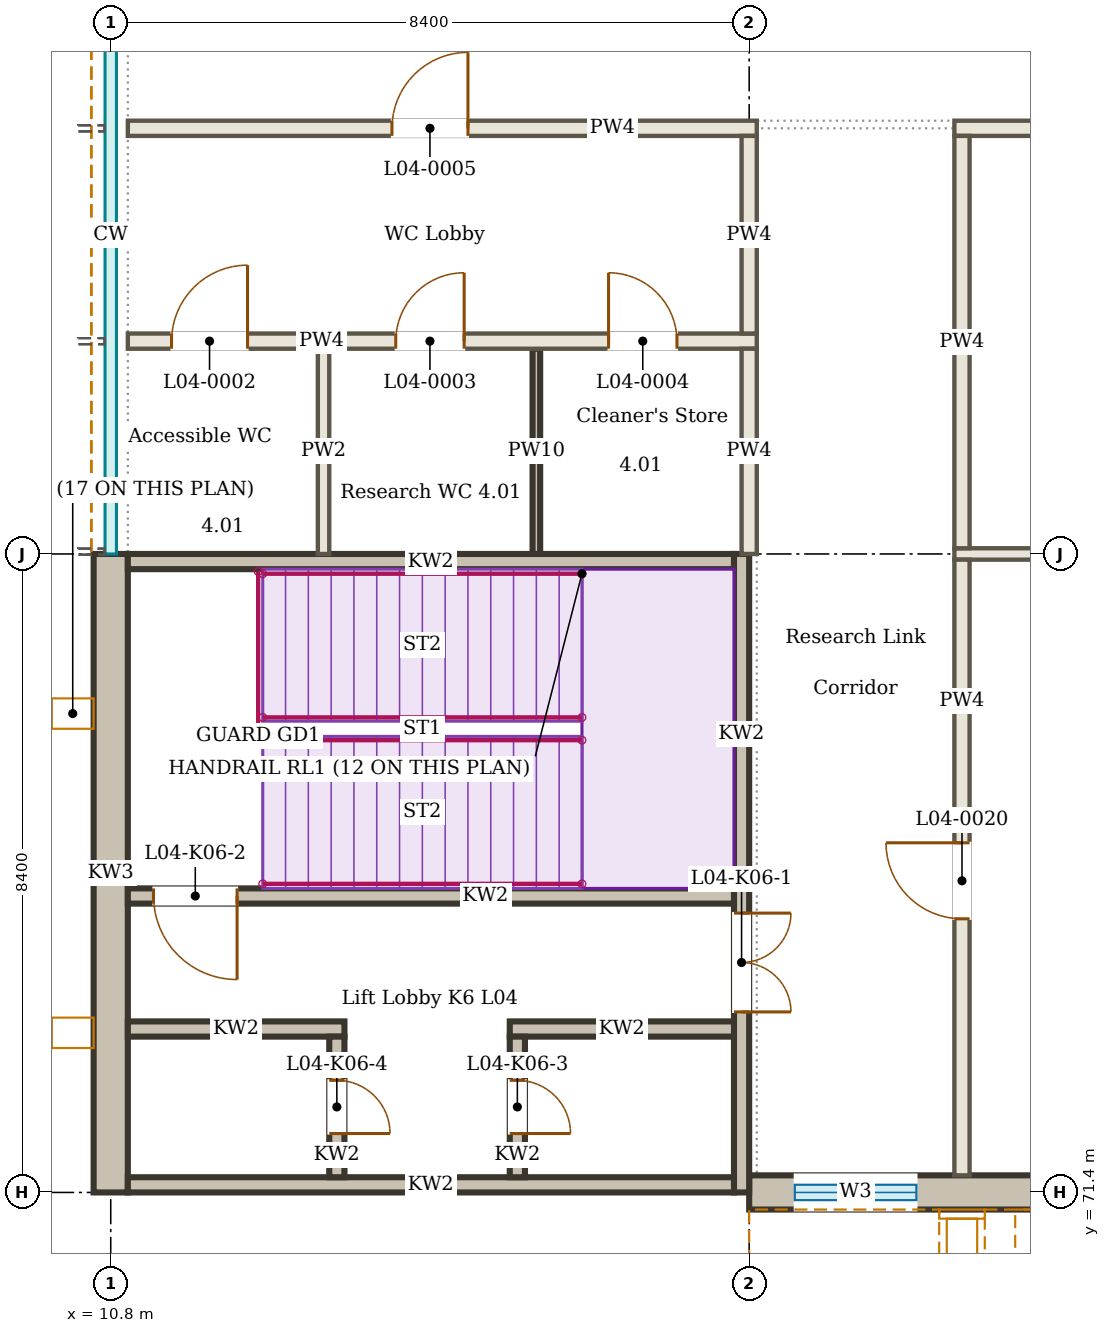
"""IFC4 building model, lengths in metres.
Left out: names, types, materials, properties, quantities, classifications, styles, units other than length and angle.
Written with IfcOpenShell. Run it as: python <this file> out.ifc"""

import sys

from ifc_helpers import new_model, si_unit, direction, frame, frame_2d, origin, place, context, subcontext, project, spatial, rectangle, extrude, element, fill, save


model = new_model("IFC4")
c1 = context("Model", 3, precision=1e-05, world=origin(), true_north=direction((0.0, 1.0)))
c2 = subcontext(c1, "Body", "Model", "MODEL_VIEW")
j1 = project(units=[si_unit("LENGTHUNIT", "METRE"), si_unit("PLANEANGLEUNIT", "RADIAN")], contexts=[c1])
p1 = place(None, origin())
s1 = spatial("IfcSite", under=j1, at=p1, CompositionType="ELEMENT")
p2 = place(p1, origin())
s2 = spatial("IfcBuilding", under=s1, at=p2, CompositionType="ELEMENT")
p3 = place(p2, frame((0.0, 0.0, 18.0)))
s3 = spatial("IfcBuildingStorey", under=s2, at=p3, CompositionType="ELEMENT", Elevation=18.0)
p4 = place(p3, frame((19.2, 71.4, 0.0), z_axis=(0.0, 0.0, 1.0), x_axis=(1.0, 0.0, 0.0)))
e1 = element("IfcWall", 1, at=p4, inside=s3, PredefinedType="SOLIDWALL", context=c2, shape_type="SweptSolid", body=[
    extrude(rectangle(XDim=8.205, YDim=0.45, at=frame_2d((4.102, 0.0))), origin(), (0.0, 0.0, 1.0), 3.886),
])
p5 = place(p4, frame((0.6, 0.0, 2.7)))
e2 = element("IfcOpeningElement", 2, at=p5, cuts=e1, PredefinedType="OPENING", context=c2, shape_type="SweptSolid", body=[
    extrude(rectangle(XDim=1.6, YDim=0.6, at=frame_2d((0.8, 0.3))), frame((0.0, 0.235, 0.0), z_axis=(0.0, -1.0, 0.0), x_axis=(1.0, 0.0, 0.0)), (0.0, 0.0, 1.0), 0.47),
])
p6 = place(p4, frame((3.75, 0.0, 1.0)))
e3 = element("IfcOpeningElement", 3, at=p6, cuts=e1, PredefinedType="OPENING", context=c2, shape_type="SweptSolid", body=[
    extrude(rectangle(XDim=0.9, YDim=1.2, at=frame_2d((0.45, 0.6))), frame((0.0, 0.235, 0.0), z_axis=(0.0, -1.0, 0.0), x_axis=(1.0, 0.0, 0.0)), (0.0, 0.0, 1.0), 0.47),
])
p7 = place(p4, frame((6.55, 0.0, 1.0)))
e4 = element("IfcOpeningElement", 4, at=p7, cuts=e1, PredefinedType="OPENING", context=c2, shape_type="SweptSolid", body=[
    extrude(rectangle(XDim=0.9, YDim=1.2, at=frame_2d((0.45, 0.6))), frame((0.0, 0.235, 0.0), z_axis=(0.0, -1.0, 0.0), x_axis=(1.0, 0.0, 0.0)), (0.0, 0.0, 1.0), 0.47),
])
p8 = place(p3, frame((21.9, 79.8, 0.0), z_axis=(0.0, 0.0, 1.0), x_axis=(1.0, 0.0, 0.0)))
e5 = element("IfcWall", 5, at=p8, inside=s3, PredefinedType="PARTITIONING", context=c2, shape_type="SweptSolid", body=[
    extrude(rectangle(XDim=5.505, YDim=0.15, at=frame_2d((2.752, 0.0))), origin(), (0.0, 0.0, 1.0), 3.9),
])
p9 = place(p3, frame((11.025, 82.6, 0.0), z_axis=(0.0, 0.0, 1.0), x_axis=(1.0, 0.0, 0.0)))
e6 = element("IfcWall", 6, at=p9, inside=s3, PredefinedType="PARTITIONING", context=c2, shape_type="SweptSolid", body=[
    extrude(rectangle(XDim=8.275, YDim=0.2, at=frame_2d((4.138, 0.0))), origin(), (0.0, 0.0, 1.0), 3.9),
])
p10 = place(p9, frame((0.575, 0.0, 0.0)))
e7 = element("IfcOpeningElement", 7, at=p10, cuts=e6, PredefinedType="OPENING", context=c2, shape_type="SweptSolid", body=[
    extrude(rectangle(XDim=1.0, YDim=2.1, at=frame_2d((0.5, 1.05))), frame((0.0, 0.11, 0.0), z_axis=(0.0, -1.0, 0.0), x_axis=(1.0, 0.0, 0.0)), (0.0, 0.0, 1.0), 0.22),
])
p11 = place(p9, frame((3.525, 0.0, 0.0)))
e8 = element("IfcOpeningElement", 8, at=p11, cuts=e6, PredefinedType="OPENING", context=c2, shape_type="SweptSolid", body=[
    extrude(rectangle(XDim=0.9, YDim=2.1, at=frame_2d((0.45, 1.05))), frame((0.0, 0.11, 0.0), z_axis=(0.0, -1.0, 0.0), x_axis=(1.0, 0.0, 0.0)), (0.0, 0.0, 1.0), 0.22),
])
p12 = place(p9, frame((6.325, 0.0, 0.0)))
e9 = element("IfcOpeningElement", 9, at=p12, cuts=e6, PredefinedType="OPENING", context=c2, shape_type="SweptSolid", body=[
    extrude(rectangle(XDim=0.9, YDim=2.1, at=frame_2d((0.45, 1.05))), frame((0.0, 0.11, 0.0), z_axis=(0.0, -1.0, 0.0), x_axis=(1.0, 0.0, 0.0)), (0.0, 0.0, 1.0), 0.22),
])
p13 = place(p3, frame((11.025, 85.4, 0.0), z_axis=(0.0, 0.0, 1.0), x_axis=(1.0, 0.0, 0.0)))
e10 = element("IfcWall", 10, at=p13, inside=s3, PredefinedType="PARTITIONING", context=c2, shape_type="SweptSolid", body=[
    extrude(rectangle(XDim=8.275, YDim=0.2, at=frame_2d((4.138, 0.0))), origin(), (0.0, 0.0, 1.0), 3.9),
])
p14 = place(p13, frame((3.475, 0.0, 0.0)))
e11 = element("IfcOpeningElement", 11, at=p14, cuts=e10, PredefinedType="OPENING", context=c2, shape_type="SweptSolid", body=[
    extrude(rectangle(XDim=1.0, YDim=2.1, at=frame_2d((0.5, 1.05))), frame((0.0, 0.11, 0.0), z_axis=(0.0, -1.0, 0.0), x_axis=(1.0, 0.0, 0.0)), (0.0, 0.0, 1.0), 0.22),
])
p15 = place(p3, frame((21.9, 85.4, 0.0), z_axis=(0.0, 0.0, 1.0), x_axis=(1.0, 0.0, 0.0)))
e12 = element("IfcWall", 12, at=p15, inside=s3, PredefinedType="PARTITIONING", context=c2, shape_type="SweptSolid", body=[
    extrude(rectangle(XDim=22.275, YDim=0.2, at=frame_2d((11.138, 0.0))), origin(), (0.0, 0.0, 1.0), 3.9),
])
p16 = place(p15, frame((3.8, 0.0, 0.0)))
e13 = element("IfcOpeningElement", 13, at=p16, cuts=e12, PredefinedType="OPENING", context=c2, shape_type="SweptSolid", body=[
    extrude(rectangle(XDim=1.0, YDim=2.1, at=frame_2d((0.5, 1.05))), frame((0.0, 0.11, 0.0), z_axis=(0.0, -1.0, 0.0), x_axis=(1.0, 0.0, 0.0)), (0.0, 0.0, 1.0), 0.22),
])
p17 = place(p15, frame((12.2, 0.0, 0.0)))
e14 = element("IfcOpeningElement", 14, at=p17, cuts=e12, PredefinedType="OPENING", context=c2, shape_type="SweptSolid", body=[
    extrude(rectangle(XDim=1.0, YDim=2.1, at=frame_2d((0.5, 1.05))), frame((0.0, 0.11, 0.0), z_axis=(0.0, -1.0, 0.0), x_axis=(1.0, 0.0, 0.0)), (0.0, 0.0, 1.0), 0.22),
])
p18 = place(p15, frame((19.2, 0.0, 0.0)))
e15 = element("IfcOpeningElement", 15, at=p18, cuts=e12, PredefinedType="OPENING", context=c2, shape_type="SweptSolid", body=[
    extrude(rectangle(XDim=1.0, YDim=2.1, at=frame_2d((0.5, 1.05))), frame((0.0, 0.11, 0.0), z_axis=(0.0, -1.0, 0.0), x_axis=(1.0, 0.0, 0.0)), (0.0, 0.0, 1.0), 0.22),
])
p19 = place(p3, frame((13.6, 79.8, 0.0), z_axis=(0.0, 0.0, 1.0), x_axis=(0.0, 1.0, 0.0)))
e16 = element("IfcWall", 16, at=p19, inside=s3, PredefinedType="PARTITIONING", context=c2, shape_type="SweptSolid", body=[
    extrude(rectangle(XDim=2.7, YDim=0.15, at=frame_2d((1.35, 0.0))), origin(), (0.0, 0.0, 1.0), 3.996),
])
p20 = place(p3, frame((16.4, 79.8, 0.0), z_axis=(0.0, 0.0, 1.0), x_axis=(0.0, 1.0, 0.0)))
e17 = element("IfcWall", 17, at=p20, inside=s3, PredefinedType="SOLIDWALL", context=c2, shape_type="SweptSolid", body=[
    extrude(rectangle(XDim=2.7, YDim=0.1, at=frame_2d((1.35, 0.0))), origin(), (0.0, 0.0, 1.0), 3.996),
])
p21 = place(p3, frame((19.2, 79.8, 0.0), z_axis=(0.0, 0.0, 1.0), x_axis=(0.0, 1.0, 0.0)))
e18 = element("IfcWall", 18, at=p21, inside=s3, PredefinedType="PARTITIONING", context=c2, shape_type="SweptSolid", body=[
    extrude(rectangle(XDim=2.7, YDim=0.2, at=frame_2d((1.35, 0.0))), origin(), (0.0, 0.0, 1.0), 3.9),
])
p22 = place(p3, frame((19.2, 82.7, 0.0), z_axis=(0.0, 0.0, 1.0), x_axis=(0.0, 1.0, 0.0)))
e19 = element("IfcWall", 19, at=p22, inside=s3, PredefinedType="PARTITIONING", context=c2, shape_type="SweptSolid", body=[
    extrude(rectangle(XDim=2.6, YDim=0.2, at=frame_2d((1.3, 0.0))), origin(), (0.0, 0.0, 1.0), 3.9),
])
p23 = place(p3, frame((22.0, 71.625, 0.0), z_axis=(0.0, 0.0, 1.0), x_axis=(0.0, 1.0, 0.0)))
e20 = element("IfcWall", 20, at=p23, inside=s3, PredefinedType="PARTITIONING", context=c2, shape_type="SweptSolid", body=[
    extrude(rectangle(XDim=8.1, YDim=0.2, at=frame_2d((4.05, 0.0))), origin(), (0.0, 0.0, 1.0), 3.9),
])
p24 = place(p23, frame((3.375, 0.0, 0.0)))
e21 = element("IfcOpeningElement", 21, at=p24, cuts=e20, PredefinedType="OPENING", context=c2, shape_type="SweptSolid", body=[
    extrude(rectangle(XDim=1.0, YDim=2.1, at=frame_2d((0.5, 1.05))), frame((0.0, 0.11, 0.0), z_axis=(0.0, -1.0, 0.0), x_axis=(1.0, 0.0, 0.0)), (0.0, 0.0, 1.0), 0.22),
])
p25 = place(p3, frame((22.0, 79.875, 0.0), z_axis=(0.0, 0.0, 1.0), x_axis=(0.0, 1.0, 0.0)))
e22 = element("IfcWall", 22, at=p25, inside=s3, PredefinedType="PARTITIONING", context=c2, shape_type="SweptSolid", body=[
    extrude(rectangle(XDim=5.425, YDim=0.2, at=frame_2d((2.712, 0.0))), origin(), (0.0, 0.0, 1.0), 3.9),
])
p26 = place(p3, frame((19.1, 79.8, 0.0), z_axis=(0.0, 0.0, 1.0), x_axis=(0.0, -1.0, 0.0)))
e23 = element("IfcWall", 23, at=p26, inside=s3, PredefinedType="SOLIDWALL", context=c2, shape_type="SweptSolid", body=[
    extrude(rectangle(XDim=8.4, YDim=0.2, at=frame_2d((4.2, 0.0))), origin(), (0.0, 0.0, 1.0), 4.5),
])
p27 = place(p26, frame((4.725, 0.0, 0.0)))
e24 = element("IfcOpeningElement", 24, at=p27, cuts=e23, PredefinedType="OPENING", context=c2, shape_type="SweptSolid", body=[
    extrude(rectangle(XDim=1.3, YDim=2.1, at=frame_2d((0.65, 1.05))), frame((0.0, 0.11, 0.0), z_axis=(0.0, -1.0, 0.0), x_axis=(1.0, 0.0, 0.0)), (0.0, 0.0, 1.0), 0.22),
])
p28 = place(p3, frame((10.8, 79.8, 0.0), z_axis=(0.0, 0.0, 1.0), x_axis=(0.0, -1.0, 0.0)))
e25 = element("IfcWall", 25, at=p28, inside=s3, PredefinedType="SOLIDWALL", context=c2, shape_type="SweptSolid", body=[
    extrude(rectangle(XDim=8.4, YDim=0.45, at=frame_2d((4.2, 0.0))), origin(), (0.0, 0.0, 1.0), 4.5),
])
for number, where, z_axis, x_axis in (
    (26, (19.0, 79.7, 0.0), (0.0, 0.0, 1.0), (-1.0, 0.0, 0.0)),
    (27, (19.0, 71.5, 0.0), (0.0, 0.0, 1.0), (-1.0, 0.0, 0.0)),
):
    element("IfcWall", number, at=place(p3, frame(where, z_axis=z_axis, x_axis=x_axis)), inside=s3, PredefinedType="SOLIDWALL", context=c2, shape_type="SweptSolid", body=[
        extrude(rectangle(XDim=7.975, YDim=0.2, at=frame_2d((3.988, 0.0))), origin(), (0.0, 0.0, 1.0), 4.5),
    ])
p29 = place(p3, frame((19.0, 75.3, 0.0), z_axis=(0.0, 0.0, 1.0), x_axis=(-1.0, 0.0, 0.0)))
e28 = element("IfcWall", 28, at=p29, inside=s3, PredefinedType="SOLIDWALL", context=c2, shape_type="SweptSolid", body=[
    extrude(rectangle(XDim=7.975, YDim=0.2, at=frame_2d((3.988, 0.0))), origin(), (0.0, 0.0, 1.0), 4.5),
])
p30 = place(p29, frame((6.538, 0.0, 0.0)))
e29 = element("IfcOpeningElement", 29, at=p30, cuts=e28, PredefinedType="OPENING", context=c2, shape_type="SweptSolid", body=[
    extrude(rectangle(XDim=1.1, YDim=2.1, at=frame_2d((0.55, 1.05))), frame((0.0, 0.11, 0.0), z_axis=(0.0, -1.0, 0.0), x_axis=(1.0, 0.0, 0.0)), (0.0, 0.0, 1.0), 0.22),
])
p31 = place(p3, frame((19.0, 73.55, 0.0), z_axis=(0.0, 0.0, 1.0), x_axis=(-1.0, 0.0, 0.0)))
e30 = element("IfcWall", 30, at=p31, inside=s3, PredefinedType="SOLIDWALL", context=c2, shape_type="SweptSolid", body=[
    extrude(rectangle(XDim=2.95, YDim=0.2, at=frame_2d((1.475, 0.0))), origin(), (0.0, 0.0, 1.0), 4.3),
])
p32 = place(p3, frame((13.875, 73.55, 0.0), z_axis=(0.0, 0.0, 1.0), x_axis=(-1.0, 0.0, 0.0)))
e31 = element("IfcWall", 31, at=p32, inside=s3, PredefinedType="SOLIDWALL", context=c2, shape_type="SweptSolid", body=[
    extrude(rectangle(XDim=2.85, YDim=0.2, at=frame_2d((1.425, 0.0))), origin(), (0.0, 0.0, 1.0), 4.3),
])
p33 = place(p3, frame((16.15, 73.45, 0.0), z_axis=(0.0, 0.0, 1.0), x_axis=(0.0, -1.0, 0.0)))
e32 = element("IfcWall", 32, at=p33, inside=s3, PredefinedType="SOLIDWALL", context=c2, shape_type="SweptSolid", body=[
    extrude(rectangle(XDim=1.85, YDim=0.2, at=frame_2d((0.925, 0.0))), origin(), (0.0, 0.0, 1.0), 4.3),
])
p34 = place(p33, frame((0.575, 0.0, 0.0)))
e33 = element("IfcOpeningElement", 33, at=p34, cuts=e32, PredefinedType="OPENING", context=c2, shape_type="SweptSolid", body=[
    extrude(rectangle(XDim=0.7, YDim=2.1, at=frame_2d((0.35, 1.05))), frame((0.0, 0.11, 0.0), z_axis=(0.0, -1.0, 0.0), x_axis=(1.0, 0.0, 0.0)), (0.0, 0.0, 1.0), 0.22),
])
p35 = place(p3, frame((13.775, 73.45, 0.0), z_axis=(0.0, 0.0, 1.0), x_axis=(0.0, -1.0, 0.0)))
e34 = element("IfcWall", 34, at=p35, inside=s3, PredefinedType="SOLIDWALL", context=c2, shape_type="SweptSolid", body=[
    extrude(rectangle(XDim=1.85, YDim=0.2, at=frame_2d((0.925, 0.0))), origin(), (0.0, 0.0, 1.0), 4.3),
])
p36 = place(p35, frame((0.575, 0.0, 0.0)))
e35 = element("IfcOpeningElement", 35, at=p36, cuts=e34, PredefinedType="OPENING", context=c2, shape_type="SweptSolid", body=[
    extrude(rectangle(XDim=0.7, YDim=2.1, at=frame_2d((0.35, 1.05))), frame((0.0, 0.11, 0.0), z_axis=(0.0, -1.0, 0.0), x_axis=(1.0, 0.0, 0.0)), (0.0, 0.0, 1.0), 0.22),
])
p37 = place(p5, origin())
e36 = element("IfcWindow", 36, at=p37, inside=s3, PartitioningType="SINGLE_PANEL", PredefinedType="WINDOW", context=c2, shape_type="SweptSolid", body=[
    extrude(rectangle(XDim=1.6, YDim=0.6, at=frame_2d((0.8, 0.3))), frame((0.0, 0.03, 0.0), z_axis=(0.0, -1.0, 0.0), x_axis=(1.0, 0.0, 0.0)), (0.0, 0.0, 1.0), 0.06),
])
fill(e2, e36)
p38 = place(p10, origin())
e37 = element("IfcDoor", 37, at=p38, inside=s3, OperationType="SINGLE_SWING_RIGHT", PredefinedType="DOOR", context=c2, shape_type="SweptSolid", body=[
    extrude(rectangle(XDim=1.0, YDim=2.1, at=frame_2d((0.5, 1.05))), frame((0.0, 0.025, 0.0), z_axis=(0.0, -1.0, 0.0), x_axis=(1.0, 0.0, 0.0)), (0.0, 0.0, 1.0), 0.05),
])
fill(e7, e37)
p39 = place(p11, origin())
e38 = element("IfcDoor", 38, at=p39, inside=s3, OperationType="SINGLE_SWING_RIGHT", PredefinedType="DOOR", context=c2, shape_type="SweptSolid", body=[
    extrude(rectangle(XDim=0.9, YDim=2.1, at=frame_2d((0.45, 1.05))), frame((0.0, 0.025, 0.0), z_axis=(0.0, -1.0, 0.0), x_axis=(1.0, 0.0, 0.0)), (0.0, 0.0, 1.0), 0.05),
])
fill(e8, e38)
p40 = place(p12, origin())
e39 = element("IfcDoor", 39, at=p40, inside=s3, OperationType="SINGLE_SWING_LEFT", PredefinedType="DOOR", context=c2, shape_type="SweptSolid", body=[
    extrude(rectangle(XDim=0.9, YDim=2.1, at=frame_2d((0.45, 1.05))), frame((0.0, 0.025, 0.0), z_axis=(0.0, -1.0, 0.0), x_axis=(1.0, 0.0, 0.0)), (0.0, 0.0, 1.0), 0.05),
])
fill(e9, e39)
p41 = place(p14, origin())
e40 = element("IfcDoor", 40, at=p41, inside=s3, OperationType="SINGLE_SWING_RIGHT", PredefinedType="DOOR", context=c2, shape_type="SweptSolid", body=[
    extrude(rectangle(XDim=1.0, YDim=2.1, at=frame_2d((0.5, 1.05))), frame((0.0, 0.025, 0.0), z_axis=(0.0, -1.0, 0.0), x_axis=(1.0, 0.0, 0.0)), (0.0, 0.0, 1.0), 0.05),
])
fill(e11, e40)
p42 = place(p24, origin())
e41 = element("IfcDoor", 41, at=p42, inside=s3, OperationType="SINGLE_SWING_RIGHT", PredefinedType="DOOR", context=c2, shape_type="SweptSolid", body=[
    extrude(rectangle(XDim=1.0, YDim=2.1, at=frame_2d((0.5, 1.05))), frame((0.0, 0.025, 0.0), z_axis=(0.0, -1.0, 0.0), x_axis=(1.0, 0.0, 0.0)), (0.0, 0.0, 1.0), 0.05),
])
fill(e21, e41)
p43 = place(p27, origin())
e42 = element("IfcDoor", 42, at=p43, inside=s3, OperationType="DOUBLE_DOOR_DOUBLE_SWING", PredefinedType="DOOR", context=c2, shape_type="SweptSolid", body=[
    extrude(rectangle(XDim=1.3, YDim=2.1, at=frame_2d((0.65, 1.05))), frame((0.0, 0.025, 0.0), z_axis=(0.0, -1.0, 0.0), x_axis=(1.0, 0.0, 0.0)), (0.0, 0.0, 1.0), 0.05),
])
fill(e24, e42)
p44 = place(p30, origin())
e43 = element("IfcDoor", 43, at=p44, inside=s3, OperationType="SINGLE_SWING_LEFT", PredefinedType="DOOR", context=c2, shape_type="SweptSolid", body=[
    extrude(rectangle(XDim=1.1, YDim=2.1, at=frame_2d((0.55, 1.05))), frame((0.0, 0.025, 0.0), z_axis=(0.0, -1.0, 0.0), x_axis=(1.0, 0.0, 0.0)), (0.0, 0.0, 1.0), 0.05),
])
fill(e29, e43)
p45 = place(p34, origin())
e44 = element("IfcDoor", 44, at=p45, inside=s3, OperationType="SINGLE_SWING_RIGHT", PredefinedType="DOOR", context=c2, shape_type="SweptSolid", body=[
    extrude(rectangle(XDim=0.7, YDim=2.1, at=frame_2d((0.35, 1.05))), frame((0.0, 0.025, 0.0), z_axis=(0.0, -1.0, 0.0), x_axis=(1.0, 0.0, 0.0)), (0.0, 0.0, 1.0), 0.05),
])
fill(e33, e44)
p46 = place(p36, origin())
e45 = element("IfcDoor", 45, at=p46, inside=s3, OperationType="SINGLE_SWING_RIGHT", PredefinedType="DOOR", context=c2, shape_type="SweptSolid", body=[
    extrude(rectangle(XDim=0.7, YDim=2.1, at=frame_2d((0.35, 1.05))), frame((0.0, 0.025, 0.0), z_axis=(0.0, -1.0, 0.0), x_axis=(1.0, 0.0, 0.0)), (0.0, 0.0, 1.0), 0.05),
])
fill(e35, e45)
save(model, sys.argv[1])
